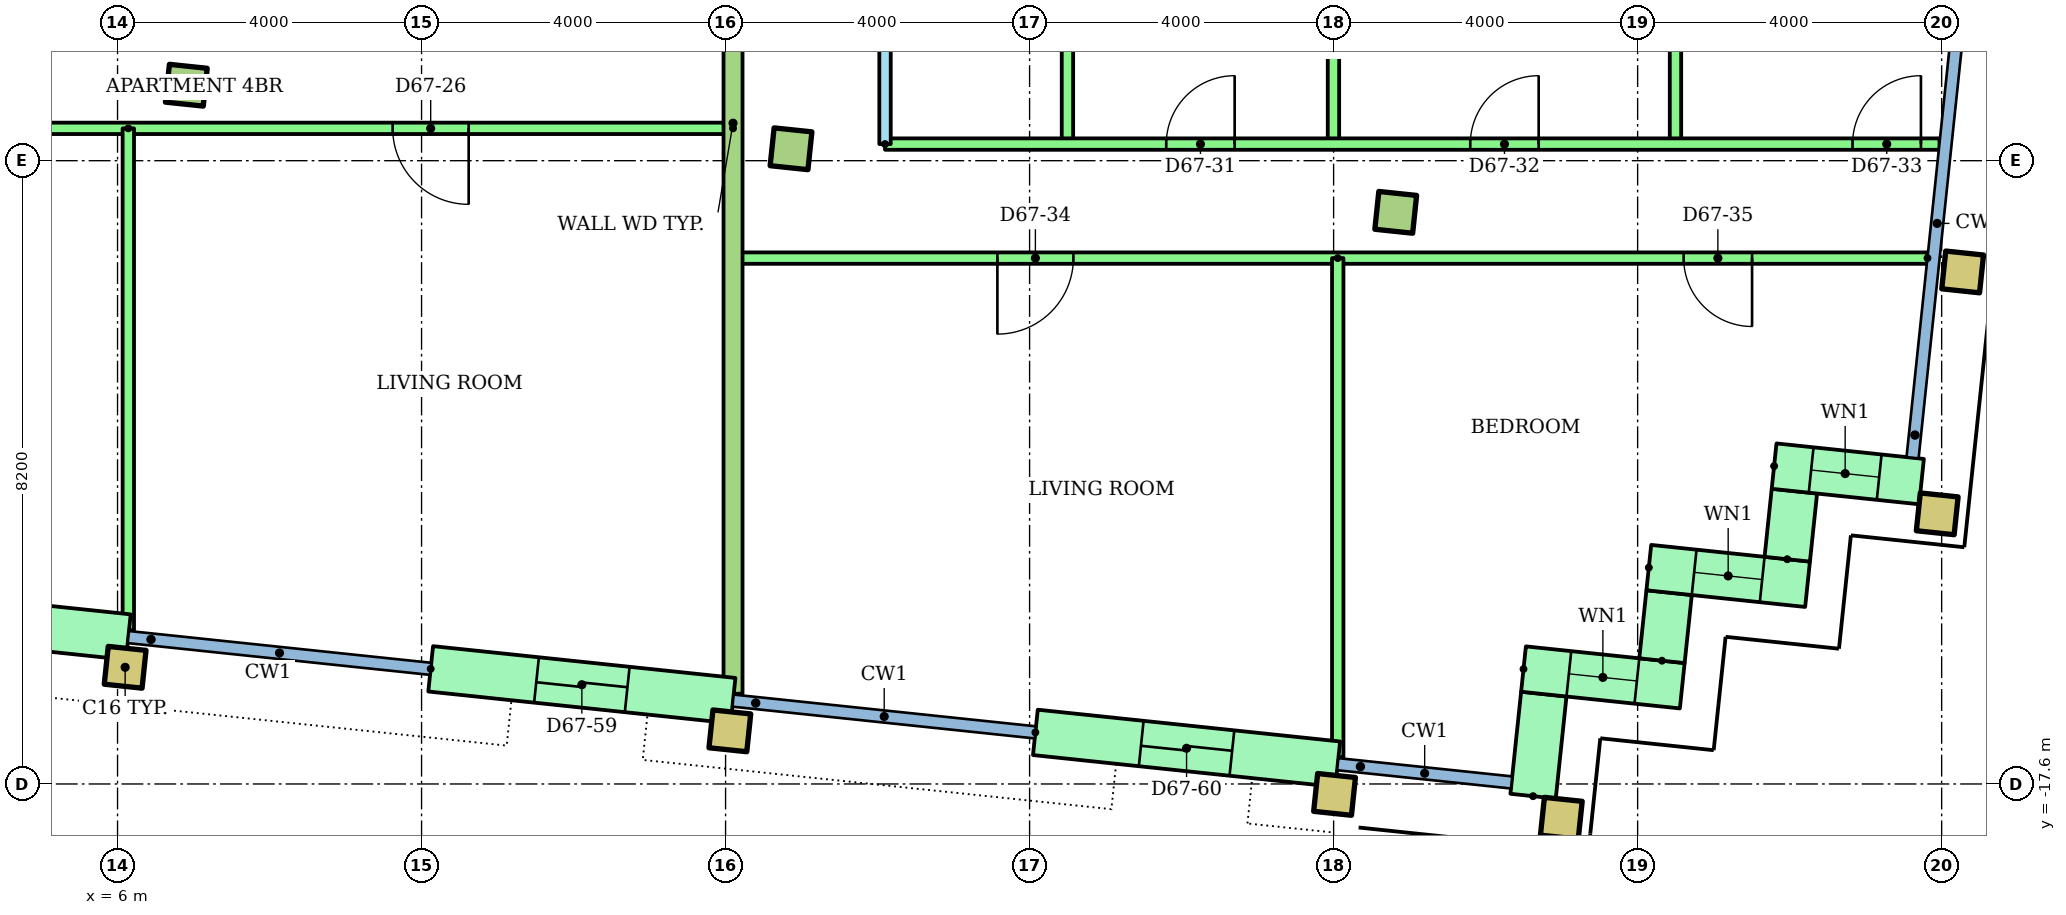
"""IFC4 building model, lengths in metres.
Left out: names, types, materials, properties, quantities, classifications, styles, units other than length and angle.
Written with IfcOpenShell. Run it as: python <this file> out.ifc"""

import sys

from ifc_helpers import new_model, si_unit, direction, frame, frame_2d, origin, origin_2d, place, context, subcontext, project, spatial, rectangle, hollow_rectangle, extrude, element, fill, save


model = new_model("IFC4")
c1 = context("Model", 3, precision=1e-05, world=origin(), true_north=direction((0.0, 1.0)))
c2 = subcontext(c1, "Body", "Model", "MODEL_VIEW")
j1 = project(units=[si_unit("LENGTHUNIT", "METRE"), si_unit("PLANEANGLEUNIT", "RADIAN")], contexts=[c1])
p1 = place(None, origin())
s1 = spatial("IfcSite", under=j1, at=p1, CompositionType="ELEMENT")
p2 = place(p1, origin())
s2 = spatial("IfcBuilding", under=s1, at=p2, CompositionType="ELEMENT")
p3 = place(p2, frame((0.0, 0.0, 259.5)))
s3 = spatial("IfcBuildingStorey", under=s2, at=p3, CompositionType="ELEMENT", Elevation=259.5)
for number, where, z_axis, x_axis in (
    (1, (6.1, -16.065, 0.0), (0.0, 0.0, 1.0), (0.995, -0.105, 0.0)),
    (2, (14.056, -16.901, 0.0), (0.0, 0.0, 1.0), (0.995, -0.105, 0.0)),
    (3, (22.012, -17.737, 0.0), (0.0, 0.0, 1.0), (0.995, -0.105, 0.0)),
    (4, (24.996, -18.051, 0.0), (0.0, 0.0, 1.0), (0.995, -0.105, 0.0)),
    (5, (29.942, -14.046, 0.0), (0.0, 0.0, 1.0), (0.995, -0.105, 0.0)),
):
    element("IfcColumn", number, at=place(p3, frame(where, z_axis=z_axis, x_axis=x_axis)), inside=s3, PredefinedType="COLUMN", context=c2, shape_type="SweptSolid", body=[
        extrude(hollow_rectangle(XDim=0.5, YDim=0.5, WallThickness=0.025, at=origin_2d()), origin(), (0.0, 0.0, 1.0), 3.2),
    ])
for number, where, z_axis, x_axis in (
    (6, (6.905, -8.407, 0.0), (0.0, 0.0, 1.0), (0.995, -0.105, 0.0)),
    (7, (14.861, -9.243, 0.0), (0.0, 0.0, 1.0), (0.995, -0.105, 0.0)),
    (8, (22.817, -10.08, 0.0), (0.0, 0.0, 1.0), (0.995, -0.105, 0.0)),
):
    element("IfcColumn", number, at=place(p3, frame(where, z_axis=z_axis, x_axis=x_axis)), inside=s3, PredefinedType="COLUMN", context=c2, shape_type="SweptSolid", body=[
        extrude(rectangle(XDim=0.5, YDim=0.5, at=origin_2d()), origin(), (0.0, 0.0, 1.0), 3.2),
    ])
p4 = place(p3, frame((30.276, -10.864, 0.0), z_axis=(0.0, 0.0, 1.0), x_axis=(0.994521895368, -0.104528463268, 0.0)))
e9 = element("IfcColumn", 9, at=p4, inside=s3, PredefinedType="COLUMN", context=c2, shape_type="SweptSolid", body=[
    extrude(hollow_rectangle(XDim=0.5, YDim=0.5, WallThickness=0.025, at=origin_2d()), origin(), (0.0, 0.0, 1.0), 3.2),
])
p5 = place(p3, frame((2.164, -15.249, 0.0), z_axis=(0.0, 0.0, 1.0), x_axis=(0.99452550138, -0.104494148666, 0.0)))
e10 = element("IfcWall", 10, at=p5, inside=s3, PredefinedType="STANDARD", context=c2, shape_type="SweptSolid", body=[
    extrude(rectangle(XDim=4.0, YDim=0.6, at=frame_2d((2.0, 0.0))), origin(), (0.0, 0.0, 1.0), 2.92),
])
p6 = place(p5, frame((1.4, 0.0, 0.0)))
e11 = element("IfcOpeningElement", 11, at=p6, cuts=e10, PredefinedType="OPENING", context=c2, shape_type="SweptSolid", body=[
    extrude(rectangle(XDim=1.2, YDim=2.1, at=frame_2d((0.6, 1.05))), frame((0.0, 0.31, 0.0), z_axis=(0.0, -1.0, 0.0), x_axis=(1.0, 0.0, 0.0)), (0.0, 0.0, 1.0), 0.62),
])
p7 = place(p3, frame((10.12, -16.085, 0.0), z_axis=(0.0, 0.0, 1.0), x_axis=(0.994519156568, -0.104554517933, 0.0)))
e12 = element("IfcWall", 12, at=p7, inside=s3, PredefinedType="STANDARD", context=c2, shape_type="SweptSolid", body=[
    extrude(rectangle(XDim=4.0, YDim=0.6, at=frame_2d((2.0, 0.0))), origin(), (0.0, 0.0, 1.0), 2.92),
])
p8 = place(p7, frame((1.4, 0.0, 0.0)))
e13 = element("IfcOpeningElement", 13, at=p8, cuts=e12, PredefinedType="OPENING", context=c2, shape_type="SweptSolid", body=[
    extrude(rectangle(XDim=1.2, YDim=2.1, at=frame_2d((0.6, 1.05))), frame((0.0, 0.31, 0.0), z_axis=(0.0, -1.0, 0.0), x_axis=(1.0, 0.0, 0.0)), (0.0, 0.0, 1.0), 0.62),
])
p9 = place(p3, frame((18.076, -16.921, 0.0), z_axis=(0.0, 0.0, 1.0), x_axis=(0.994519156568, -0.104554517933, 0.0)))
e14 = element("IfcWall", 14, at=p9, inside=s3, PredefinedType="STANDARD", context=c2, shape_type="SweptSolid", body=[
    extrude(rectangle(XDim=4.0, YDim=0.6, at=frame_2d((2.0, 0.0))), origin(), (0.0, 0.0, 1.0), 2.92),
])
p10 = place(p9, frame((1.4, 0.0, 0.0)))
e15 = element("IfcOpeningElement", 15, at=p10, cuts=e14, PredefinedType="OPENING", context=c2, shape_type="SweptSolid", body=[
    extrude(rectangle(XDim=1.2, YDim=2.1, at=frame_2d((0.6, 1.05))), frame((0.0, 0.31, 0.0), z_axis=(0.0, -1.0, 0.0), x_axis=(1.0, 0.0, 0.0)), (0.0, 0.0, 1.0), 0.62),
])
p11 = place(p3, frame((24.625, -17.76, 0.0), z_axis=(0.0, 0.0, 1.0), x_axis=(0.104355269718, 0.994540083497, 0.0)))
e16 = element("IfcWall", 16, at=p11, inside=s3, PredefinedType="STANDARD", context=c2, shape_type="SweptSolid", body=[
    extrude(rectangle(XDim=1.35, YDim=0.6, at=frame_2d((0.675, 0.0))), origin(), (0.0, 0.0, 1.0), 2.92),
])
p12 = place(p3, frame((24.499, -16.088, 0.0), z_axis=(0.0, 0.0, 1.0), x_axis=(0.994522640205, -0.104521376379, 0.0)))
e17 = element("IfcWall", 17, at=p12, inside=s3, PredefinedType="STANDARD", context=c2, shape_type="SweptSolid", body=[
    extrude(rectangle(XDim=2.1, YDim=0.6, at=frame_2d((1.05, 0.0))), origin(), (0.0, 0.0, 1.0), 2.92),
])
p13 = place(p12, frame((0.6, 0.0, 0.9)))
e18 = element("IfcOpeningElement", 18, at=p13, cuts=e17, PredefinedType="OPENING", context=c2, shape_type="SweptSolid", body=[
    extrude(rectangle(XDim=0.9, YDim=1.5, at=frame_2d((0.45, 0.75))), frame((0.0, 0.31, 0.0), z_axis=(0.0, -1.0, 0.0), x_axis=(1.0, 0.0, 0.0)), (0.0, 0.0, 1.0), 0.62),
])
p14 = place(p3, frame((26.32, -15.978, 0.0), z_axis=(0.0, 0.0, 1.0), x_axis=(0.104444712852, 0.994530694326, 0.0)))
e19 = element("IfcWall", 19, at=p14, inside=s3, PredefinedType="STANDARD", context=c2, shape_type="SweptSolid", body=[
    extrude(rectangle(XDim=0.9, YDim=0.6, at=frame_2d((0.45, 0.0))), origin(), (0.0, 0.0, 1.0), 2.92),
])
p15 = place(p3, frame((26.147, -14.753, 0.0), z_axis=(0.0, 0.0, 1.0), x_axis=(0.994522640205, -0.104521376379, 0.0)))
e20 = element("IfcWall", 20, at=p15, inside=s3, PredefinedType="STANDARD", context=c2, shape_type="SweptSolid", body=[
    extrude(rectangle(XDim=2.1, YDim=0.6, at=frame_2d((1.05, 0.0))), origin(), (0.0, 0.0, 1.0), 2.92),
])
p16 = place(p15, frame((0.6, 0.0, 0.9)))
e21 = element("IfcOpeningElement", 21, at=p16, cuts=e20, PredefinedType="OPENING", context=c2, shape_type="SweptSolid", body=[
    extrude(rectangle(XDim=0.9, YDim=1.5, at=frame_2d((0.45, 0.75))), frame((0.0, 0.31, 0.0), z_axis=(0.0, -1.0, 0.0), x_axis=(1.0, 0.0, 0.0)), (0.0, 0.0, 1.0), 0.62),
])
p17 = place(p3, frame((27.969, -14.643, 0.0), z_axis=(0.0, 0.0, 1.0), x_axis=(0.104416541099, 0.994533652495, 0.0)))
e22 = element("IfcWall", 22, at=p17, inside=s3, PredefinedType="STANDARD", context=c2, shape_type="SweptSolid", body=[
    extrude(rectangle(XDim=0.9, YDim=0.6, at=frame_2d((0.45, 0.0))), origin(), (0.0, 0.0, 1.0), 2.92),
])
p18 = place(p3, frame((27.796, -13.418, 0.0), z_axis=(0.0, 0.0, 1.0), x_axis=(0.994519850893, -0.104547913319, 0.0)))
e23 = element("IfcWall", 23, at=p18, inside=s3, PredefinedType="STANDARD", context=c2, shape_type="SweptSolid", body=[
    extrude(rectangle(XDim=1.95, YDim=0.6, at=frame_2d((0.975, 0.0))), origin(), (0.0, 0.0, 1.0), 2.92),
])
p19 = place(p18, frame((0.49, 0.0, 0.9)))
e24 = element("IfcOpeningElement", 24, at=p19, cuts=e23, PredefinedType="OPENING", context=c2, shape_type="SweptSolid", body=[
    extrude(rectangle(XDim=0.9, YDim=1.5, at=frame_2d((0.45, 0.75))), frame((0.0, 0.31, 0.0), z_axis=(0.0, -1.0, 0.0), x_axis=(1.0, 0.0, 0.0)), (0.0, 0.0, 1.0), 0.62),
])
p20 = place(p3, frame((14.098, -8.975, 0.0), z_axis=(0.0, 0.0, 1.0), x_axis=(-1.0, 0.0, 0.0)))
e25 = element("IfcWall", 25, at=p20, inside=s3, PredefinedType="PARTITIONING", context=c2, shape_type="SweptSolid", body=[
    extrude(rectangle(XDim=23.868, YDim=0.15, at=frame_2d((11.934, 0.0))), origin(), (0.0, 0.0, 1.0), 2.4),
])
p21 = place(p20, frame((21.429, 0.0, 0.0)))
e26 = element("IfcOpeningElement", 26, at=p21, cuts=e25, PredefinedType="OPENING", context=c2, shape_type="SweptSolid", body=[
    extrude(rectangle(XDim=0.9, YDim=2.1, at=frame_2d((0.45, 1.05))), frame((0.0, 0.085, 0.0), z_axis=(0.0, -1.0, 0.0), x_axis=(1.0, 0.0, 0.0)), (0.0, 0.0, 1.0), 0.17),
])
p22 = place(p20, frame((17.451, 0.0, 0.0)))
e27 = element("IfcOpeningElement", 27, at=p22, cuts=e25, PredefinedType="OPENING", context=c2, shape_type="SweptSolid", body=[
    extrude(rectangle(XDim=0.9, YDim=2.1, at=frame_2d((0.45, 1.05))), frame((0.0, 0.085, 0.0), z_axis=(0.0, -1.0, 0.0), x_axis=(1.0, 0.0, 0.0)), (0.0, 0.0, 1.0), 0.17),
])
p23 = place(p20, frame((12.252, 0.0, 0.0)))
e28 = element("IfcOpeningElement", 28, at=p23, cuts=e25, PredefinedType="OPENING", context=c2, shape_type="SweptSolid", body=[
    extrude(rectangle(XDim=0.9, YDim=2.1, at=frame_2d((0.45, 1.05))), frame((0.0, 0.085, 0.0), z_axis=(0.0, -1.0, 0.0), x_axis=(1.0, 0.0, 0.0)), (0.0, 0.0, 1.0), 0.17),
])
p24 = place(p20, frame((9.495, 0.0, 0.0)))
e29 = element("IfcOpeningElement", 29, at=p24, cuts=e25, PredefinedType="OPENING", context=c2, shape_type="SweptSolid", body=[
    extrude(rectangle(XDim=0.9, YDim=2.1, at=frame_2d((0.45, 1.05))), frame((0.0, 0.085, 0.0), z_axis=(0.0, -1.0, 0.0), x_axis=(1.0, 0.0, 0.0)), (0.0, 0.0, 1.0), 0.17),
])
p25 = place(p20, frame((3.478, 0.0, 0.0)))
e30 = element("IfcOpeningElement", 30, at=p25, cuts=e25, PredefinedType="OPENING", context=c2, shape_type="SweptSolid", body=[
    extrude(rectangle(XDim=1.0, YDim=2.1, at=frame_2d((0.5, 1.05))), frame((0.0, 0.085, 0.0), z_axis=(0.0, -1.0, 0.0), x_axis=(1.0, 0.0, 0.0)), (0.0, 0.0, 1.0), 0.17),
])
p26 = place(p3, frame((6.142, -8.975, 0.0), z_axis=(0.0, 0.0, 1.0), x_axis=(0.0, -1.0, 0.0)))
e31 = element("IfcWall", 31, at=p26, inside=s3, PredefinedType="PARTITIONING", context=c2, shape_type="SweptSolid", body=[
    extrude(rectangle(XDim=6.602, YDim=0.15, at=frame_2d((3.301, 0.0))), origin(), (0.0, 0.0, 1.0), 2.4),
])
p27 = place(p3, frame((16.098, -1.4, 0.0), z_axis=(0.0, 0.0, 1.0), x_axis=(0.0, -1.0, 0.0)))
e32 = element("IfcWall", 32, at=p27, inside=s3, PredefinedType="PARTITIONING", context=c2, shape_type="SweptSolid", body=[
    extrude(rectangle(XDim=7.782, YDim=0.15, at=frame_2d((3.891, 0.0))), origin(), (0.0, 0.0, 1.0), 2.4),
])
p28 = place(p27, frame((1.675, 0.0, 0.0)))
e33 = element("IfcOpeningElement", 33, at=p28, cuts=e32, PredefinedType="OPENING", context=c2, shape_type="SweptSolid", body=[
    extrude(rectangle(XDim=0.9, YDim=2.1, at=frame_2d((0.45, 1.05))), frame((0.0, 0.085, 0.0), z_axis=(0.0, -1.0, 0.0), x_axis=(1.0, 0.0, 0.0)), (0.0, 0.0, 1.0), 0.17),
])
p29 = place(p27, frame((5.616, 0.0, 0.0)))
e34 = element("IfcOpeningElement", 34, at=p29, cuts=e32, PredefinedType="OPENING", context=c2, shape_type="SweptSolid", body=[
    extrude(rectangle(XDim=0.8, YDim=2.1, at=frame_2d((0.4, 1.05))), frame((0.0, 0.085, 0.0), z_axis=(0.0, -1.0, 0.0), x_axis=(1.0, 0.0, 0.0)), (0.0, 0.0, 1.0), 0.17),
])
for number, where, z_axis, x_axis in (
    (35, (18.498, -1.4, 0.0), (0.0, 0.0, 1.0), (0.0, -1.0, 0.0)),
    (36, (21.998, -1.4, 0.0), (0.0, 0.0, 1.0), (0.0, -1.0, 0.0)),
    (37, (26.498, -1.4, 0.0), (0.0, 0.0, 1.0), (0.0, -1.0, 0.0)),
):
    element("IfcWall", number, at=place(p3, frame(where, z_axis=z_axis, x_axis=x_axis)), inside=s3, PredefinedType="PARTITIONING", context=c2, shape_type="SweptSolid", body=[
        extrude(rectangle(XDim=7.782, YDim=0.15, at=frame_2d((3.891, 0.0))), origin(), (0.0, 0.0, 1.0), 2.4),
    ])
p30 = place(p3, frame((16.098, -9.182, 0.0)))
e38 = element("IfcWall", 38, at=p30, inside=s3, PredefinedType="PARTITIONING", context=c2, shape_type="SweptSolid", body=[
    extrude(rectangle(XDim=13.873, YDim=0.15, at=frame_2d((6.937, 0.0))), origin(), (0.0, 0.0, 1.0), 2.4),
])
p31 = place(p30, frame((3.7, 0.0, 0.0)))
e39 = element("IfcOpeningElement", 39, at=p31, cuts=e38, PredefinedType="OPENING", context=c2, shape_type="SweptSolid", body=[
    extrude(rectangle(XDim=0.9, YDim=2.1, at=frame_2d((0.45, 1.05))), frame((0.0, 0.085, 0.0), z_axis=(0.0, -1.0, 0.0), x_axis=(1.0, 0.0, 0.0)), (0.0, 0.0, 1.0), 0.17),
])
p32 = place(p30, frame((7.7, 0.0, 0.0)))
e40 = element("IfcOpeningElement", 40, at=p32, cuts=e38, PredefinedType="OPENING", context=c2, shape_type="SweptSolid", body=[
    extrude(rectangle(XDim=0.9, YDim=2.1, at=frame_2d((0.45, 1.05))), frame((0.0, 0.085, 0.0), z_axis=(0.0, -1.0, 0.0), x_axis=(1.0, 0.0, 0.0)), (0.0, 0.0, 1.0), 0.17),
])
p33 = place(p30, frame((12.729, 0.0, 0.0)))
e41 = element("IfcOpeningElement", 41, at=p33, cuts=e38, PredefinedType="OPENING", context=c2, shape_type="SweptSolid", body=[
    extrude(rectangle(XDim=0.9, YDim=2.1, at=frame_2d((0.45, 1.05))), frame((0.0, 0.085, 0.0), z_axis=(0.0, -1.0, 0.0), x_axis=(1.0, 0.0, 0.0)), (0.0, 0.0, 1.0), 0.17),
])
p34 = place(p3, frame((29.814, -10.682, 0.0), z_axis=(0.0, 0.0, 1.0), x_axis=(-1.0, 0.0, 0.0)))
e42 = element("IfcWall", 42, at=p34, inside=s3, PredefinedType="PARTITIONING", context=c2, shape_type="SweptSolid", body=[
    extrude(rectangle(XDim=15.716, YDim=0.15, at=frame_2d((7.858, 0.0))), origin(), (0.0, 0.0, 1.0), 2.4),
])
p35 = place(p34, frame((11.238, 0.0, 0.0)))
e43 = element("IfcOpeningElement", 43, at=p35, cuts=e42, PredefinedType="OPENING", context=c2, shape_type="SweptSolid", body=[
    extrude(rectangle(XDim=1.0, YDim=2.1, at=frame_2d((0.5, 1.05))), frame((0.0, 0.085, 0.0), z_axis=(0.0, -1.0, 0.0), x_axis=(1.0, 0.0, 0.0)), (0.0, 0.0, 1.0), 0.17),
])
p36 = place(p34, frame((2.308, 0.0, 0.0)))
e44 = element("IfcOpeningElement", 44, at=p36, cuts=e42, PredefinedType="OPENING", context=c2, shape_type="SweptSolid", body=[
    extrude(rectangle(XDim=0.9, YDim=2.1, at=frame_2d((0.45, 1.05))), frame((0.0, 0.085, 0.0), z_axis=(0.0, -1.0, 0.0), x_axis=(1.0, 0.0, 0.0)), (0.0, 0.0, 1.0), 0.17),
])
p37 = place(p3, frame((22.054, -10.682, 0.0), z_axis=(0.0, 0.0, 1.0), x_axis=(0.0, -1.0, 0.0)))
e45 = element("IfcWall", 45, at=p37, inside=s3, PredefinedType="PARTITIONING", context=c2, shape_type="SweptSolid", body=[
    extrude(rectangle(XDim=6.567, YDim=0.15, at=frame_2d((3.284, 0.0))), origin(), (0.0, 0.0, 1.0), 2.4),
])
p38 = place(p3, frame((14.098, -1.4, 0.0), z_axis=(0.0, 0.0, 1.0), x_axis=(0.0, -1.0, 0.0)))
e46 = element("IfcWall", 46, at=p38, inside=s3, PredefinedType="PARTITIONING", context=c2, shape_type="SweptSolid", body=[
    extrude(rectangle(XDim=15.013, YDim=0.25, at=frame_2d((7.506, 0.0))), origin(), (0.0, 0.0, 1.0), 2.4),
])
p39 = place(p13, origin())
e47 = element("IfcWindow", 47, at=p39, inside=s3, PartitioningType="SINGLE_PANEL", PredefinedType="WINDOW", context=c2, shape_type="SweptSolid", body=[
    extrude(rectangle(XDim=0.9, YDim=1.5, at=frame_2d((0.45, 0.75))), frame((0.0, 0.03, 0.0), z_axis=(0.0, -1.0, 0.0), x_axis=(1.0, 0.0, 0.0)), (0.0, 0.0, 1.0), 0.06),
])
fill(e18, e47)
p40 = place(p16, origin())
e48 = element("IfcWindow", 48, at=p40, inside=s3, PartitioningType="SINGLE_PANEL", PredefinedType="WINDOW", context=c2, shape_type="SweptSolid", body=[
    extrude(rectangle(XDim=0.9, YDim=1.5, at=frame_2d((0.45, 0.75))), frame((0.0, 0.03, 0.0), z_axis=(0.0, -1.0, 0.0), x_axis=(1.0, 0.0, 0.0)), (0.0, 0.0, 1.0), 0.06),
])
fill(e21, e48)
p41 = place(p19, origin())
e49 = element("IfcWindow", 49, at=p41, inside=s3, PartitioningType="SINGLE_PANEL", PredefinedType="WINDOW", context=c2, shape_type="SweptSolid", body=[
    extrude(rectangle(XDim=0.9, YDim=1.5, at=frame_2d((0.45, 0.75))), frame((0.0, 0.03, 0.0), z_axis=(0.0, -1.0, 0.0), x_axis=(1.0, 0.0, 0.0)), (0.0, 0.0, 1.0), 0.06),
])
fill(e24, e49)
p42 = place(p25, origin())
e50 = element("IfcDoor", 50, at=p42, inside=s3, OperationType="SINGLE_SWING_LEFT", PredefinedType="DOOR", context=c2, shape_type="SweptSolid", body=[
    extrude(rectangle(XDim=1.0, YDim=2.1, at=frame_2d((0.5, 1.05))), frame((0.0, 0.025, 0.0), z_axis=(0.0, -1.0, 0.0), x_axis=(1.0, 0.0, 0.0)), (0.0, 0.0, 1.0), 0.05),
])
fill(e30, e50)
p43 = place(p31, origin())
e51 = element("IfcDoor", 51, at=p43, inside=s3, OperationType="SINGLE_SWING_RIGHT", PredefinedType="DOOR", context=c2, shape_type="SweptSolid", body=[
    extrude(rectangle(XDim=0.9, YDim=2.1, at=frame_2d((0.45, 1.05))), frame((0.0, 0.025, 0.0), z_axis=(0.0, -1.0, 0.0), x_axis=(1.0, 0.0, 0.0)), (0.0, 0.0, 1.0), 0.05),
])
fill(e39, e51)
p44 = place(p32, origin())
e52 = element("IfcDoor", 52, at=p44, inside=s3, OperationType="SINGLE_SWING_RIGHT", PredefinedType="DOOR", context=c2, shape_type="SweptSolid", body=[
    extrude(rectangle(XDim=0.9, YDim=2.1, at=frame_2d((0.45, 1.05))), frame((0.0, 0.025, 0.0), z_axis=(0.0, -1.0, 0.0), x_axis=(1.0, 0.0, 0.0)), (0.0, 0.0, 1.0), 0.05),
])
fill(e40, e52)
p45 = place(p33, origin())
e53 = element("IfcDoor", 53, at=p45, inside=s3, OperationType="SINGLE_SWING_RIGHT", PredefinedType="DOOR", context=c2, shape_type="SweptSolid", body=[
    extrude(rectangle(XDim=0.9, YDim=2.1, at=frame_2d((0.45, 1.05))), frame((0.0, 0.025, 0.0), z_axis=(0.0, -1.0, 0.0), x_axis=(1.0, 0.0, 0.0)), (0.0, 0.0, 1.0), 0.05),
])
fill(e41, e53)
p46 = place(p35, origin())
e54 = element("IfcDoor", 54, at=p46, inside=s3, OperationType="SINGLE_SWING_RIGHT", PredefinedType="DOOR", context=c2, shape_type="SweptSolid", body=[
    extrude(rectangle(XDim=1.0, YDim=2.1, at=frame_2d((0.5, 1.05))), frame((0.0, 0.025, 0.0), z_axis=(0.0, -1.0, 0.0), x_axis=(1.0, 0.0, 0.0)), (0.0, 0.0, 1.0), 0.05),
])
fill(e43, e54)
p47 = place(p36, origin())
e55 = element("IfcDoor", 55, at=p47, inside=s3, OperationType="SINGLE_SWING_LEFT", PredefinedType="DOOR", context=c2, shape_type="SweptSolid", body=[
    extrude(rectangle(XDim=0.9, YDim=2.1, at=frame_2d((0.45, 1.05))), frame((0.0, 0.025, 0.0), z_axis=(0.0, -1.0, 0.0), x_axis=(1.0, 0.0, 0.0)), (0.0, 0.0, 1.0), 0.05),
])
fill(e44, e55)
p48 = place(p8, origin())
e56 = element("IfcDoor", 56, at=p48, inside=s3, OperationType="SLIDING_TO_LEFT", PredefinedType="DOOR", context=c2, shape_type="SweptSolid", body=[
    extrude(rectangle(XDim=1.2, YDim=2.1, at=frame_2d((0.6, 1.05))), frame((0.0, 0.025, 0.0), z_axis=(0.0, -1.0, 0.0), x_axis=(1.0, 0.0, 0.0)), (0.0, 0.0, 1.0), 0.05),
])
fill(e13, e56)
p49 = place(p10, origin())
e57 = element("IfcDoor", 57, at=p49, inside=s3, OperationType="SLIDING_TO_LEFT", PredefinedType="DOOR", context=c2, shape_type="SweptSolid", body=[
    extrude(rectangle(XDim=1.2, YDim=2.1, at=frame_2d((0.6, 1.05))), frame((0.0, 0.025, 0.0), z_axis=(0.0, -1.0, 0.0), x_axis=(1.0, 0.0, 0.0)), (0.0, 0.0, 1.0), 0.05),
])
fill(e15, e57)
save(model, sys.argv[1])
